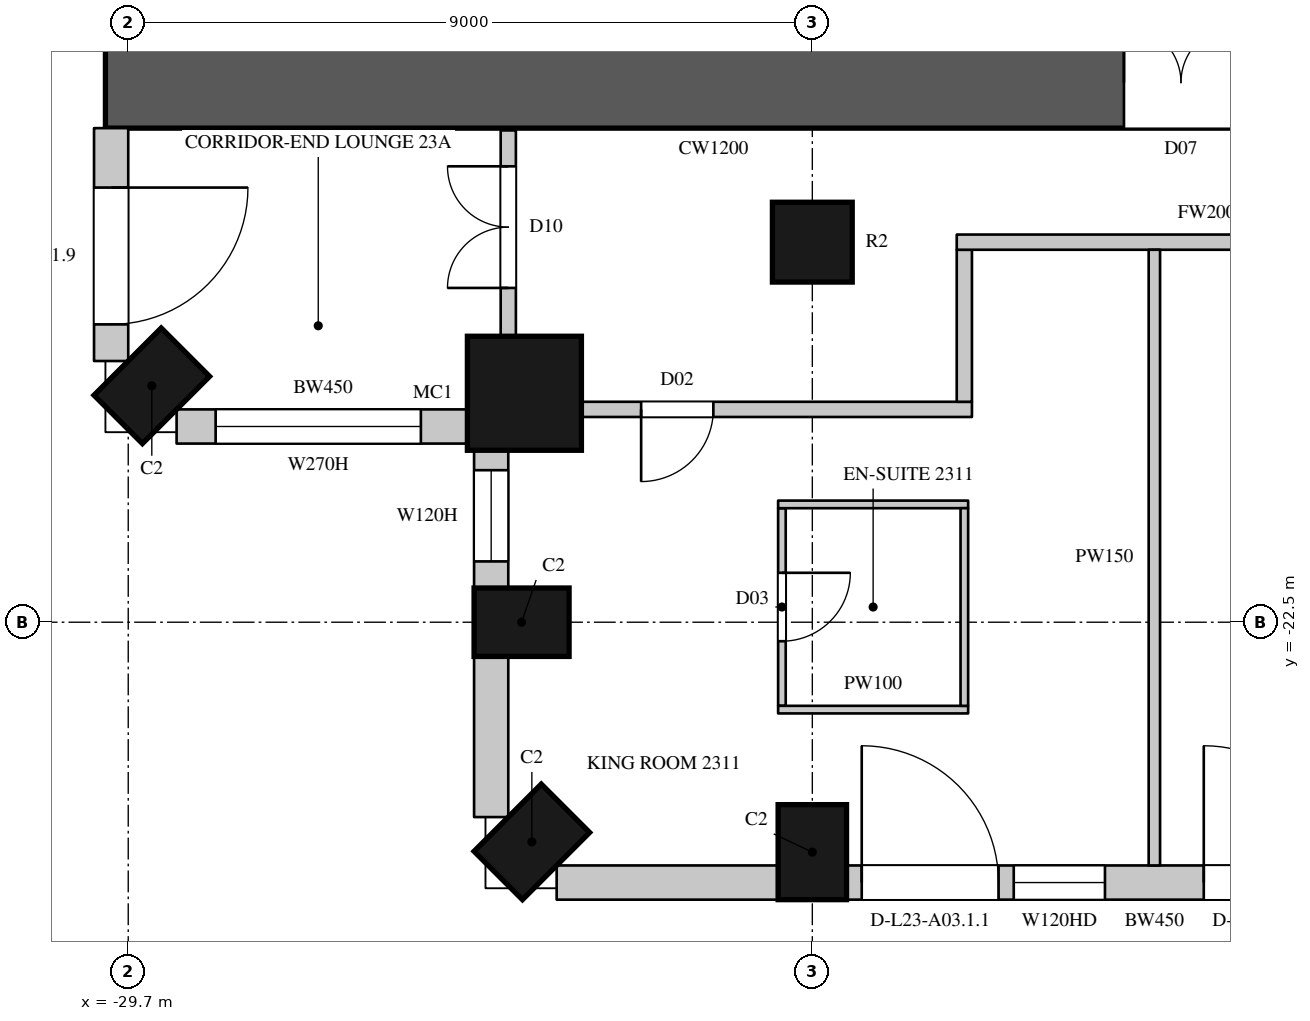
"""IFC4 building model, lengths in metres.
Left out: names, types, materials, properties, quantities, classifications, styles, units other than length and angle.
Written with IfcOpenShell. Run it as: python <this file> out.ifc"""

import sys

from ifc_helpers import new_model, si_unit, direction, frame, frame_2d, origin, origin_2d, place, context, subcontext, project, spatial, rectangle, circle, extrude, element, fill, save


model = new_model("IFC4")
c1 = context("Model", 3, precision=1e-05, world=origin(), true_north=direction((0.0, 1.0)))
c2 = subcontext(c1, "Body", "Model", "MODEL_VIEW")
j1 = project(units=[si_unit("LENGTHUNIT", "METRE"), si_unit("PLANEANGLEUNIT", "RADIAN")], contexts=[c1])
p1 = place(None, origin())
s1 = spatial("IfcSite", under=j1, at=p1, CompositionType="ELEMENT")
p2 = place(p1, origin())
s2 = spatial("IfcBuilding", under=s1, at=p2, CompositionType="ELEMENT")
p3 = place(p2, frame((0.0, 0.0, 113.1)))
s3 = spatial("IfcBuildingStorey", under=s2, at=p3, CompositionType="ELEMENT", Elevation=113.1)
p4 = place(p3, frame((-29.39, -19.39, 0.0), z_axis=(0.0, 0.0, 1.0), x_axis=(0.707106781187, -0.707106781187, 0.0)))
e1 = element("IfcColumn", 1, at=p4, inside=s3, PredefinedType="COLUMN", context=c2, shape_type="SweptSolid", body=[
    extrude(rectangle(XDim=0.9, YDim=1.25, at=origin_2d()), origin(), (0.0, 0.0, 1.0), 3.6),
])
p5 = place(p3, frame((-24.488, -19.488, 0.0), z_axis=(0.0, 0.0, 1.0), x_axis=(1.0, 0.0, 0.0)))
e2 = element("IfcColumn", 2, at=p5, inside=s3, PredefinedType="COLUMN", context=c2, shape_type="SweptSolid", body=[
    extrude(circle(Radius=0.75, at=origin_2d()), origin(), (0.0, 0.0, 1.0), 3.6),
])
for number, where, z_axis, x_axis in (
    (3, (-24.525, -22.5, 0.0), (0.0, 0.0, 1.0), (0.0, -1.0, 0.0)),
    (4, (-24.39, -25.39, 0.0), (0.0, 0.0, 1.0), (0.707, -0.707, 0.0)),
    (5, (-20.7, -25.525, 0.0), (0.0, 0.0, 1.0), (1.0, 0.0, 0.0)),
):
    element("IfcColumn", number, at=place(p3, frame(where, z_axis=z_axis, x_axis=x_axis)), inside=s3, PredefinedType="COLUMN", context=c2, shape_type="SweptSolid", body=[
        extrude(rectangle(XDim=0.9, YDim=1.25, at=origin_2d()), origin(), (0.0, 0.0, 1.0), 3.6),
    ])
p6 = place(p3, frame((-20.7, -17.5, 0.0), z_axis=(0.0, 0.0, 1.0), x_axis=(1.0, 0.0, 0.0)))
e6 = element("IfcColumn", 6, at=p6, inside=s3, PredefinedType="COLUMN", context=c2, shape_type="SweptSolid", body=[
    extrude(circle(Radius=0.525, at=origin_2d()), origin(), (0.0, 0.0, 1.0), 3.6),
])
p7 = place(p3, frame((-29.925, -16.0, 0.0), z_axis=(0.0, 0.0, 1.0), x_axis=(0.0, -1.0, 0.0)))
e7 = element("IfcWall", 7, at=p7, inside=s3, PredefinedType="SOLIDWALL", context=c2, shape_type="SweptSolid", body=[
    extrude(rectangle(XDim=3.064, YDim=0.45, at=frame_2d((1.532, 0.0))), origin(), (0.0, 0.0, 1.0), 3.3),
])
p8 = place(p7, frame((0.782, 0.0, 0.0)))
e8 = element("IfcOpeningElement", 8, at=p8, cuts=e7, PredefinedType="OPENING", context=c2, shape_type="SweptSolid", body=[
    extrude(rectangle(XDim=1.8, YDim=2.4, at=frame_2d((0.9, 1.2))), frame((0.0, 0.235, 0.0), z_axis=(0.0, -1.0, 0.0), x_axis=(1.0, 0.0, 0.0)), (0.0, 0.0, 1.0), 0.47),
])
p9 = place(p3, frame((-29.064, -19.925, 0.0), z_axis=(0.0, 0.0, 1.0), x_axis=(1.0, 0.0, 0.0)))
e9 = element("IfcWall", 9, at=p9, inside=s3, PredefinedType="SOLIDWALL", context=c2, shape_type="SweptSolid", body=[
    extrude(rectangle(XDim=3.857, YDim=0.45, at=frame_2d((1.928, 0.0))), origin(), (0.0, 0.0, 1.0), 3.3),
])
p10 = place(p9, frame((0.514, 0.0, 1.05)))
e10 = element("IfcOpeningElement", 10, at=p10, cuts=e9, PredefinedType="OPENING", context=c2, shape_type="SweptSolid", body=[
    extrude(rectangle(XDim=2.7, YDim=2.0, at=frame_2d((1.35, 1.0))), frame((0.0, 0.235, 0.0), z_axis=(0.0, -1.0, 0.0), x_axis=(1.0, 0.0, 0.0)), (0.0, 0.0, 1.0), 0.47),
])
p11 = place(p3, frame((-24.925, -20.207, 0.0), z_axis=(0.0, 0.0, 1.0), x_axis=(0.0, -1.0, 0.0)))
e11 = element("IfcWall", 11, at=p11, inside=s3, PredefinedType="SOLIDWALL", context=c2, shape_type="SweptSolid", body=[
    extrude(rectangle(XDim=1.843, YDim=0.45, at=frame_2d((0.921, 0.0))), origin(), (0.0, 0.0, 1.0), 3.3),
])
p12 = place(p11, frame((0.293, 0.0, 1.05)))
e12 = element("IfcOpeningElement", 12, at=p12, cuts=e11, PredefinedType="OPENING", context=c2, shape_type="SweptSolid", body=[
    extrude(rectangle(XDim=1.2, YDim=2.0, at=frame_2d((0.6, 1.0))), frame((0.0, 0.235, 0.0), z_axis=(0.0, -1.0, 0.0), x_axis=(1.0, 0.0, 0.0)), (0.0, 0.0, 1.0), 0.47),
])
p13 = place(p3, frame((-24.925, -22.95, 0.0), z_axis=(0.0, 0.0, 1.0), x_axis=(0.0, -1.0, 0.0)))
e13 = element("IfcWall", 13, at=p13, inside=s3, PredefinedType="SOLIDWALL", context=c2, shape_type="SweptSolid", body=[
    extrude(rectangle(XDim=2.114, YDim=0.45, at=frame_2d((1.057, 0.0))), origin(), (0.0, 0.0, 1.0), 3.3),
])
p14 = place(p3, frame((-24.064, -25.925, 0.0), z_axis=(0.0, 0.0, 1.0), x_axis=(1.0, 0.0, 0.0)))
e14 = element("IfcWall", 14, at=p14, inside=s3, PredefinedType="SOLIDWALL", context=c2, shape_type="SweptSolid", body=[
    extrude(rectangle(XDim=2.914, YDim=0.45, at=frame_2d((1.457, 0.0))), origin(), (0.0, 0.0, 1.0), 3.3),
])
p15 = place(p3, frame((-20.25, -25.925, 0.0), z_axis=(0.0, 0.0, 1.0), x_axis=(1.0, 0.0, 0.0)))
e15 = element("IfcWall", 15, at=p15, inside=s3, PredefinedType="SOLIDWALL", context=c2, shape_type="SweptSolid", body=[
    extrude(rectangle(XDim=8.1, YDim=0.45, at=frame_2d((4.05, 0.0))), origin(), (0.0, 0.0, 1.0), 3.3),
])
p16 = place(p15, frame((0.2, 0.0, 0.0)))
e16 = element("IfcOpeningElement", 16, at=p16, cuts=e15, PredefinedType="OPENING", context=c2, shape_type="SweptSolid", body=[
    extrude(rectangle(XDim=1.8, YDim=2.4, at=frame_2d((0.9, 1.2))), frame((0.0, 0.235, 0.0), z_axis=(0.0, -1.0, 0.0), x_axis=(1.0, 0.0, 0.0)), (0.0, 0.0, 1.0), 0.47),
])
p17 = place(p15, frame((2.2, 0.0, 1.05)))
e17 = element("IfcOpeningElement", 17, at=p17, cuts=e15, PredefinedType="OPENING", context=c2, shape_type="SweptSolid", body=[
    extrude(rectangle(XDim=1.2, YDim=2.0, at=frame_2d((0.6, 1.0))), frame((0.0, 0.235, 0.0), z_axis=(0.0, -1.0, 0.0), x_axis=(1.0, 0.0, 0.0)), (0.0, 0.0, 1.0), 0.47),
])
p18 = place(p15, frame((4.7, 0.0, 0.0)))
e18 = element("IfcOpeningElement", 18, at=p18, cuts=e15, PredefinedType="OPENING", context=c2, shape_type="SweptSolid", body=[
    extrude(rectangle(XDim=1.8, YDim=2.4, at=frame_2d((0.9, 1.2))), frame((0.0, 0.235, 0.0), z_axis=(0.0, -1.0, 0.0), x_axis=(1.0, 0.0, 0.0)), (0.0, 0.0, 1.0), 0.47),
])
p19 = place(p15, frame((6.7, 0.0, 1.05)))
e19 = element("IfcOpeningElement", 19, at=p19, cuts=e15, PredefinedType="OPENING", context=c2, shape_type="SweptSolid", body=[
    extrude(rectangle(XDim=1.2, YDim=2.0, at=frame_2d((0.6, 1.0))), frame((0.0, 0.235, 0.0), z_axis=(0.0, -1.0, 0.0), x_axis=(1.0, 0.0, 0.0)), (0.0, 0.0, 1.0), 0.47),
])
p20 = place(p3, frame((-30.0, -15.4, 0.0), z_axis=(0.0, 0.0, 1.0), x_axis=(1.0, 0.0, 0.0)))
e20 = element("IfcWall", 20, at=p20, inside=s3, PredefinedType="SHEAR", context=c2, shape_type="SweptSolid", body=[
    extrude(rectangle(XDim=16.0, YDim=1.2, at=frame_2d((8.0, 0.0))), origin(), (0.0, 0.0, 1.0), 3.6),
])
p21 = place(p20, frame((13.4, 0.0, 0.0)))
e21 = element("IfcOpeningElement", 21, at=p21, cuts=e20, PredefinedType="OPENING", context=c2, shape_type="SweptSolid", body=[
    extrude(rectangle(XDim=1.5, YDim=2.4, at=frame_2d((0.75, 1.2))), frame((0.0, 0.61, 0.0), z_axis=(0.0, -1.0, 0.0), x_axis=(1.0, 0.0, 0.0)), (0.0, 0.0, 1.0), 1.22),
])
p22 = place(p3, frame((-24.7, -18.752, 0.0), z_axis=(0.0, 0.0, 1.0), x_axis=(0.0, 1.0, 0.0)))
e22 = element("IfcWall", 22, at=p22, inside=s3, PredefinedType="PARTITIONING", context=c2, shape_type="SweptSolid", body=[
    extrude(rectangle(XDim=2.722, YDim=0.2, at=frame_2d((1.361, 0.0))), origin(), (0.0, 0.0, 1.0), 3.3),
])
p23 = place(p22, frame((0.65, 0.0, 0.0)))
e23 = element("IfcOpeningElement", 23, at=p23, cuts=e22, PredefinedType="OPENING", context=c2, shape_type="SweptSolid", body=[
    extrude(rectangle(XDim=1.6, YDim=2.4, at=frame_2d((0.8, 1.2))), frame((0.0, 0.11, 0.0), z_axis=(0.0, -1.0, 0.0), x_axis=(1.0, 0.0, 0.0)), (0.0, 0.0, 1.0), 0.22),
])
p24 = place(p3, frame((-23.752, -19.7, 0.0), z_axis=(0.0, 0.0, 1.0), x_axis=(1.0, 0.0, 0.0)))
e24 = element("IfcWall", 24, at=p24, inside=s3, PredefinedType="PARTITIONING", context=c2, shape_type="SweptSolid", body=[
    extrude(rectangle(XDim=5.152, YDim=0.2, at=frame_2d((2.576, 0.0))), origin(), (0.0, 0.0, 1.0), 3.3),
])
p25 = place(p24, frame((0.8, 0.0, 0.0)))
e25 = element("IfcOpeningElement", 25, at=p25, cuts=e24, PredefinedType="OPENING", context=c2, shape_type="SweptSolid", body=[
    extrude(rectangle(XDim=0.95, YDim=2.2, at=frame_2d((0.475, 1.1))), frame((0.0, 0.11, 0.0), z_axis=(0.0, -1.0, 0.0), x_axis=(1.0, 0.0, 0.0)), (0.0, 0.0, 1.0), 0.22),
])
p26 = place(p3, frame((-18.7, -19.6, 0.0), z_axis=(0.0, 0.0, 1.0), x_axis=(0.0, 1.0, 0.0)))
e26 = element("IfcWall", 26, at=p26, inside=s3, PredefinedType="PARTITIONING", context=c2, shape_type="SweptSolid", body=[
    extrude(rectangle(XDim=2.0, YDim=0.2, at=frame_2d((1.0, 0.0))), origin(), (0.0, 0.0, 1.0), 3.3),
])
p27 = place(p3, frame((-18.8, -17.5, 0.0), z_axis=(0.0, 0.0, 1.0), x_axis=(1.0, 0.0, 0.0)))
e27 = element("IfcWall", 27, at=p27, inside=s3, PredefinedType="PARTITIONING", context=c2, shape_type="SweptSolid", body=[
    extrude(rectangle(XDim=6.575, YDim=0.2, at=frame_2d((3.288, 0.0))), origin(), (0.0, 0.0, 1.0), 2.75),
])
p28 = place(p27, frame((3.85, 0.0, 0.0)))
e28 = element("IfcOpeningElement", 28, at=p28, cuts=e27, PredefinedType="OPENING", context=c2, shape_type="SweptSolid", body=[
    extrude(rectangle(XDim=1.1, YDim=2.4, at=frame_2d((0.55, 1.2))), frame((0.0, 0.11, 0.0), z_axis=(0.0, -1.0, 0.0), x_axis=(1.0, 0.0, 0.0)), (0.0, 0.0, 1.0), 0.22),
])
p29 = place(p3, frame((-16.2, -25.7, 0.0), z_axis=(0.0, 0.0, 1.0), x_axis=(0.0, 1.0, 0.0)))
e29 = element("IfcWall", 29, at=p29, inside=s3, PredefinedType="PARTITIONING", context=c2, shape_type="SweptSolid", body=[
    extrude(rectangle(XDim=8.1, YDim=0.15, at=frame_2d((4.05, 0.0))), origin(), (0.0, 0.0, 1.0), 2.65),
])
p30 = place(p3, frame((-21.1, -23.6, 0.0), z_axis=(0.0, 0.0, 1.0), x_axis=(0.0, 1.0, 0.0)))
e30 = element("IfcWall", 30, at=p30, inside=s3, PredefinedType="PARTITIONING", context=c2, shape_type="SweptSolid", body=[
    extrude(rectangle(XDim=2.6, YDim=0.1, at=frame_2d((1.3, 0.0))), origin(), (0.0, 0.0, 1.0), 3.3),
])
p31 = place(p30, frame((0.85, 0.0, 0.0)))
e31 = element("IfcOpeningElement", 31, at=p31, cuts=e30, PredefinedType="OPENING", context=c2, shape_type="SweptSolid", body=[
    extrude(rectangle(XDim=0.9, YDim=2.2, at=frame_2d((0.45, 1.1))), frame((0.0, 0.06, 0.0), z_axis=(0.0, -1.0, 0.0), x_axis=(1.0, 0.0, 0.0)), (0.0, 0.0, 1.0), 0.12),
])
for number, where, z_axis, x_axis in (
    (32, (-21.15, -23.65, 0.0), (0.0, 0.0, 1.0), (1.0, 0.0, 0.0)),
    (33, (-21.15, -20.95, 0.0), (0.0, 0.0, 1.0), (1.0, 0.0, 0.0)),
):
    element("IfcWall", number, at=place(p3, frame(where, z_axis=z_axis, x_axis=x_axis)), inside=s3, PredefinedType="PARTITIONING", context=c2, shape_type="SweptSolid", body=[
        extrude(rectangle(XDim=2.5, YDim=0.1, at=frame_2d((1.25, 0.0))), origin(), (0.0, 0.0, 1.0), 3.3),
    ])
p32 = place(p3, frame((-18.7, -23.6, 0.0), z_axis=(0.0, 0.0, 1.0), x_axis=(0.0, 1.0, 0.0)))
e34 = element("IfcWall", 34, at=p32, inside=s3, PredefinedType="PARTITIONING", context=c2, shape_type="SweptSolid", body=[
    extrude(rectangle(XDim=2.6, YDim=0.1, at=frame_2d((1.3, 0.0))), origin(), (0.0, 0.0, 1.0), 3.3),
])
p33 = place(p8, origin())
e35 = element("IfcDoor", 35, at=p33, inside=s3, OperationType="SLIDING_TO_LEFT", PredefinedType="DOOR", context=c2, shape_type="SweptSolid", body=[
    extrude(rectangle(XDim=1.8, YDim=2.4, at=frame_2d((0.9, 1.2))), frame((0.0, 0.13, 0.0), z_axis=(0.0, -1.0, 0.0), x_axis=(1.0, 0.0, 0.0)), (0.0, 0.0, 1.0), 0.05),
])
fill(e8, e35)
p34 = place(p10, origin())
e36 = element("IfcWindow", 36, at=p34, inside=s3, PartitioningType="SINGLE_PANEL", PredefinedType="WINDOW", context=c2, shape_type="SweptSolid", body=[
    extrude(rectangle(XDim=2.7, YDim=2.0, at=frame_2d((1.35, 1.0))), frame((0.0, 0.135, 0.0), z_axis=(0.0, -1.0, 0.0), x_axis=(1.0, 0.0, 0.0)), (0.0, 0.0, 1.0), 0.06),
])
fill(e10, e36)
p35 = place(p12, origin())
e37 = element("IfcWindow", 37, at=p35, inside=s3, PartitioningType="SINGLE_PANEL", PredefinedType="WINDOW", context=c2, shape_type="SweptSolid", body=[
    extrude(rectangle(XDim=1.2, YDim=2.0, at=frame_2d((0.6, 1.0))), frame((0.0, 0.135, 0.0), z_axis=(0.0, -1.0, 0.0), x_axis=(1.0, 0.0, 0.0)), (0.0, 0.0, 1.0), 0.06),
])
fill(e12, e37)
p36 = place(p16, origin())
e38 = element("IfcDoor", 38, at=p36, inside=s3, OperationType="SLIDING_TO_LEFT", PredefinedType="DOOR", context=c2, shape_type="SweptSolid", body=[
    extrude(rectangle(XDim=1.8, YDim=2.4, at=frame_2d((0.9, 1.2))), frame((0.0, 0.13, 0.0), z_axis=(0.0, -1.0, 0.0), x_axis=(1.0, 0.0, 0.0)), (0.0, 0.0, 1.0), 0.05),
])
fill(e16, e38)
p37 = place(p17, origin())
e39 = element("IfcWindow", 39, at=p37, inside=s3, PartitioningType="SINGLE_PANEL", PredefinedType="WINDOW", context=c2, shape_type="SweptSolid", body=[
    extrude(rectangle(XDim=1.2, YDim=2.0, at=frame_2d((0.6, 1.0))), frame((0.0, 0.135, 0.0), z_axis=(0.0, -1.0, 0.0), x_axis=(1.0, 0.0, 0.0)), (0.0, 0.0, 1.0), 0.06),
])
fill(e17, e39)
p38 = place(p18, origin())
e40 = element("IfcDoor", 40, at=p38, inside=s3, OperationType="SLIDING_TO_LEFT", PredefinedType="DOOR", context=c2, shape_type="SweptSolid", body=[
    extrude(rectangle(XDim=1.8, YDim=2.4, at=frame_2d((0.9, 1.2))), frame((0.0, 0.13, 0.0), z_axis=(0.0, -1.0, 0.0), x_axis=(1.0, 0.0, 0.0)), (0.0, 0.0, 1.0), 0.05),
])
fill(e18, e40)
p39 = place(p23, origin())
e41 = element("IfcDoor", 41, at=p39, inside=s3, OperationType="DOUBLE_DOOR_SINGLE_SWING", PredefinedType="DOOR", context=c2, shape_type="SweptSolid", body=[
    extrude(rectangle(XDim=1.6, YDim=2.4, at=frame_2d((0.8, 1.2))), frame((0.0, 0.025, 0.0), z_axis=(0.0, -1.0, 0.0), x_axis=(1.0, 0.0, 0.0)), (0.0, 0.0, 1.0), 0.05),
])
fill(e23, e41)
p40 = place(p25, origin())
e42 = element("IfcDoor", 42, at=p40, inside=s3, OperationType="SINGLE_SWING_RIGHT", PredefinedType="DOOR", context=c2, shape_type="SweptSolid", body=[
    extrude(rectangle(XDim=0.95, YDim=2.2, at=frame_2d((0.475, 1.1))), frame((0.0, 0.025, 0.0), z_axis=(0.0, -1.0, 0.0), x_axis=(1.0, 0.0, 0.0)), (0.0, 0.0, 1.0), 0.05),
])
fill(e25, e42)
p41 = place(p31, origin())
e43 = element("IfcDoor", 43, at=p41, inside=s3, OperationType="SINGLE_SWING_LEFT", PredefinedType="DOOR", context=c2, shape_type="SweptSolid", body=[
    extrude(rectangle(XDim=0.9, YDim=2.2, at=frame_2d((0.45, 1.1))), frame((0.0, 0.025, 0.0), z_axis=(0.0, -1.0, 0.0), x_axis=(1.0, 0.0, 0.0)), (0.0, 0.0, 1.0), 0.05),
])
fill(e31, e43)
p42 = place(p21, origin())
e44 = element("IfcDoor", 44, at=p42, inside=s3, OperationType="DOUBLE_DOOR_SINGLE_SWING", PredefinedType="DOOR", context=c2, shape_type="SweptSolid", body=[
    extrude(rectangle(XDim=1.5, YDim=2.4, at=frame_2d((0.75, 1.2))), frame((0.0, 0.025, 0.0), z_axis=(0.0, -1.0, 0.0), x_axis=(1.0, 0.0, 0.0)), (0.0, 0.0, 1.0), 0.05),
])
fill(e21, e44)
save(model, sys.argv[1])
